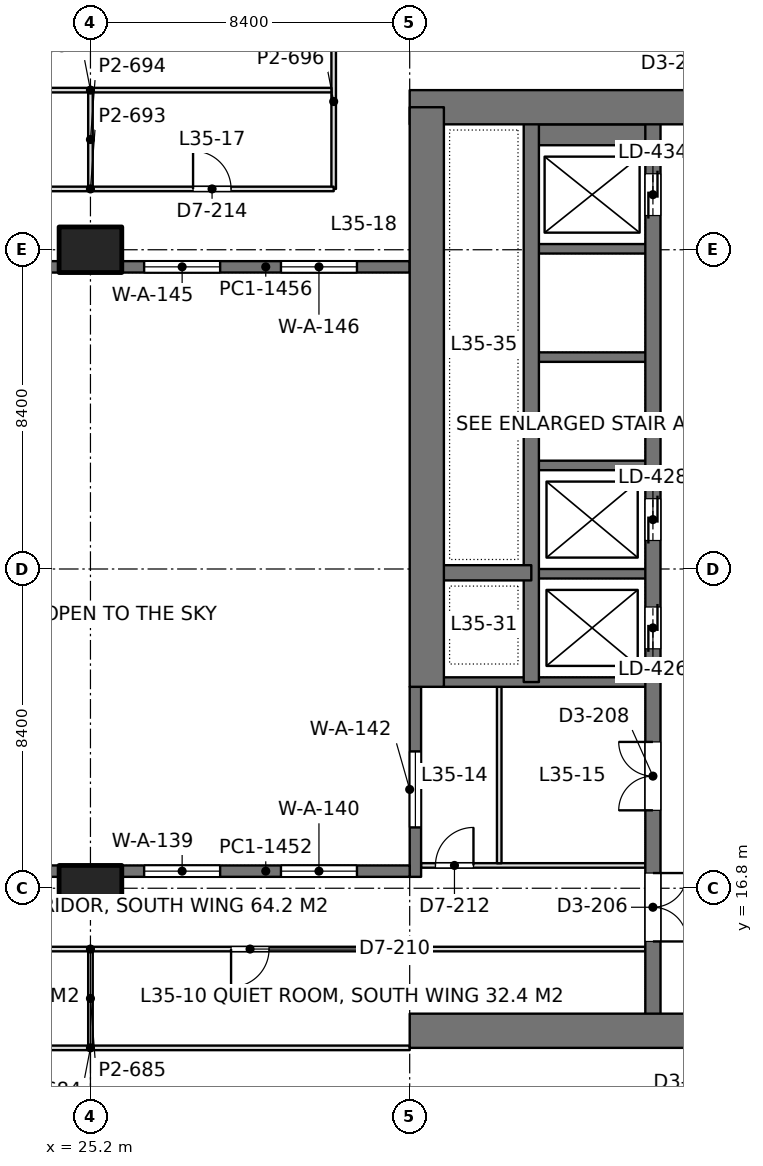
"""IFC4 building model, lengths in metres.
Left out: names, types, materials, properties, quantities, classifications, styles, units other than length and angle.
Written with IfcOpenShell. Run it as: python <this file> out.ifc"""

import sys

from ifc_helpers import new_model, si_unit, direction, frame, frame_2d, origin, origin_2d, place, context, subcontext, project, spatial, rectangle, extrude, element, fill, save


model = new_model("IFC4")
c1 = context("Model", 3, precision=1e-05, world=origin(), true_north=direction((0.0, 1.0)))
c2 = subcontext(c1, "Body", "Model", "MODEL_VIEW")
j1 = project(units=[si_unit("LENGTHUNIT", "METRE"), si_unit("PLANEANGLEUNIT", "RADIAN")], contexts=[c1])
p1 = place(None, origin())
s1 = spatial("IfcSite", under=j1, at=p1, CompositionType="ELEMENT")
p2 = place(p1, origin())
s2 = spatial("IfcBuilding", under=s1, at=p2, CompositionType="ELEMENT")
p3 = place(p2, frame((0.0, 0.0, 155.4)))
s3 = spatial("IfcBuildingStorey", under=s2, at=p3, CompositionType="ELEMENT", Elevation=155.4)
for number, where, z_axis, x_axis in (
    (1, (25.2, 16.8, 0.0), (0.0, 0.0, 1.0), (1.0, 0.0, 0.0)),
    (2, (25.2, 33.6, 0.0), (0.0, 0.0, 1.0), (1.0, 0.0, 0.0)),
):
    element("IfcColumn", number, at=place(p3, frame(where, z_axis=z_axis, x_axis=x_axis)), inside=s3, PredefinedType="COLUMN", context=c2, shape_type="SweptSolid", body=[
        extrude(rectangle(XDim=1.65, YDim=1.2, at=origin_2d()), origin(), (0.0, 0.0, 1.0), 4.2),
    ])
p4 = place(p3, frame((33.6, 13.05, 0.0), z_axis=(0.0, 0.0, 1.0), x_axis=(1.0, 0.0, 0.0)))
e3 = element("IfcWall", 3, at=p4, inside=s3, PredefinedType="SHEAR", context=c2, shape_type="SweptSolid", body=[
    extrude(rectangle(XDim=18.0, YDim=0.9, at=frame_2d((9.0, 0.0))), origin(), (0.0, 0.0, 1.0), 4.2),
])
p5 = place(p4, frame((7.25, 0.0, 0.0)))
e4 = element("IfcOpeningElement", 4, at=p5, cuts=e3, PredefinedType="OPENING", context=c2, shape_type="SweptSolid", body=[
    extrude(rectangle(XDim=1.8, YDim=2.4, at=frame_2d((0.9, 1.2))), frame((0.0, 0.46, 0.0), z_axis=(0.0, -1.0, 0.0), x_axis=(1.0, 0.0, 0.0)), (0.0, 0.0, 1.0), 0.92),
])
p6 = place(p3, frame((33.6, 37.35, 0.0), z_axis=(0.0, 0.0, 1.0), x_axis=(1.0, 0.0, 0.0)))
e5 = element("IfcWall", 5, at=p6, inside=s3, PredefinedType="SHEAR", context=c2, shape_type="SweptSolid", body=[
    extrude(rectangle(XDim=18.0, YDim=0.9, at=frame_2d((9.0, 0.0))), origin(), (0.0, 0.0, 1.0), 4.2),
])
p7 = place(p6, frame((7.25, 0.0, 0.0)))
e6 = element("IfcOpeningElement", 6, at=p7, cuts=e5, PredefinedType="OPENING", context=c2, shape_type="SweptSolid", body=[
    extrude(rectangle(XDim=1.8, YDim=2.4, at=frame_2d((0.9, 1.2))), frame((0.0, 0.46, 0.0), z_axis=(0.0, -1.0, 0.0), x_axis=(1.0, 0.0, 0.0)), (0.0, 0.0, 1.0), 0.92),
])
p8 = place(p3, frame((34.05, 22.1, 0.0), z_axis=(0.0, 0.0, 1.0), x_axis=(0.0, 1.0, 0.0)))
e7 = element("IfcWall", 7, at=p8, inside=s3, PredefinedType="SHEAR", context=c2, shape_type="SweptSolid", body=[
    extrude(rectangle(XDim=15.25, YDim=0.9, at=frame_2d((7.625, 0.0))), origin(), (0.0, 0.0, 1.0), 4.2),
])
p9 = place(p3, frame((40.0, 13.05, 0.0), z_axis=(0.0, 0.0, 1.0), x_axis=(0.0, 1.0, 0.0)))
e8 = element("IfcWall", 8, at=p9, inside=s3, PredefinedType="SHEAR", context=c2, shape_type="SweptSolid", body=[
    extrude(rectangle(XDim=24.3, YDim=0.4, at=frame_2d((12.15, 0.0))), origin(), (0.0, 0.0, 1.0), 4.2),
])
p10 = place(p9, frame((10.05, 0.0, 0.0)))
e9 = element("IfcOpeningElement", 9, at=p10, cuts=e8, PredefinedType="OPENING", context=c2, shape_type="SweptSolid", body=[
    extrude(rectangle(XDim=1.1, YDim=2.2, at=frame_2d((0.55, 1.1))), frame((0.0, 0.21, 0.0), z_axis=(0.0, -1.0, 0.0), x_axis=(1.0, 0.0, 0.0)), (0.0, 0.0, 1.0), 0.42),
])
p11 = place(p9, frame((12.9, 0.0, 0.0)))
e10 = element("IfcOpeningElement", 10, at=p11, cuts=e8, PredefinedType="OPENING", context=c2, shape_type="SweptSolid", body=[
    extrude(rectangle(XDim=1.1, YDim=2.2, at=frame_2d((0.55, 1.1))), frame((0.0, 0.21, 0.0), z_axis=(0.0, -1.0, 0.0), x_axis=(1.0, 0.0, 0.0)), (0.0, 0.0, 1.0), 0.42),
])
p12 = place(p9, frame((21.45, 0.0, 0.0)))
e11 = element("IfcOpeningElement", 11, at=p12, cuts=e8, PredefinedType="OPENING", context=c2, shape_type="SweptSolid", body=[
    extrude(rectangle(XDim=1.1, YDim=2.2, at=frame_2d((0.55, 1.1))), frame((0.0, 0.21, 0.0), z_axis=(0.0, -1.0, 0.0), x_axis=(1.0, 0.0, 0.0)), (0.0, 0.0, 1.0), 0.42),
])
p13 = place(p9, frame((2.35, 0.0, 0.0)))
e12 = element("IfcOpeningElement", 12, at=p13, cuts=e8, PredefinedType="OPENING", context=c2, shape_type="SweptSolid", body=[
    extrude(rectangle(XDim=1.8, YDim=2.4, at=frame_2d((0.9, 1.2))), frame((0.0, 0.21, 0.0), z_axis=(0.0, -1.0, 0.0), x_axis=(1.0, 0.0, 0.0)), (0.0, 0.0, 1.0), 0.42),
])
p14 = place(p9, frame((5.8, 0.0, 0.0)))
e13 = element("IfcOpeningElement", 13, at=p14, cuts=e8, PredefinedType="OPENING", context=c2, shape_type="SweptSolid", body=[
    extrude(rectangle(XDim=1.8, YDim=2.4, at=frame_2d((0.9, 1.2))), frame((0.0, 0.21, 0.0), z_axis=(0.0, -1.0, 0.0), x_axis=(1.0, 0.0, 0.0)), (0.0, 0.0, 1.0), 0.42),
])
p15 = place(p3, frame((36.8, 22.225, 0.0), z_axis=(0.0, 0.0, 1.0), x_axis=(0.0, 1.0, 0.0)))
e14 = element("IfcWall", 14, at=p15, inside=s3, PredefinedType="SHEAR", context=c2, shape_type="SweptSolid", body=[
    extrude(rectangle(XDim=15.125, YDim=0.4, at=frame_2d((7.562, 0.0))), origin(), (0.0, 0.0, 1.0), 4.2),
])
p16 = place(p3, frame((36.8, 25.1, 0.0), z_axis=(0.0, 0.0, 1.0), x_axis=(-1.0, 0.0, 0.0)))
e15 = element("IfcWall", 15, at=p16, inside=s3, PredefinedType="SHEAR", context=c2, shape_type="SweptSolid", body=[
    extrude(rectangle(XDim=2.75, YDim=0.4, at=frame_2d((1.375, 0.0))), origin(), (0.0, 0.0, 1.0), 4.2),
])
p17 = place(p3, frame((40.0, 22.225, 0.0), z_axis=(0.0, 0.0, 1.0), x_axis=(-1.0, 0.0, 0.0)))
e16 = element("IfcWall", 16, at=p17, inside=s3, PredefinedType="SHEAR", context=c2, shape_type="SweptSolid", body=[
    extrude(rectangle(XDim=5.95, YDim=0.25, at=frame_2d((2.975, 0.0))), origin(), (0.0, 0.0, 1.0), 4.2),
])
for number, where, z_axis, x_axis in (
    (17, (40.0, 25.075, 0.0), (0.0, 0.0, 1.0), (-1.0, 0.0, 0.0)),
    (18, (40.0, 27.925, 0.0), (0.0, 0.0, 1.0), (-1.0, 0.0, 0.0)),
    (19, (40.0, 30.775, 0.0), (0.0, 0.0, 1.0), (-1.0, 0.0, 0.0)),
    (20, (40.0, 33.625, 0.0), (0.0, 0.0, 1.0), (-1.0, 0.0, 0.0)),
):
    element("IfcWall", number, at=place(p3, frame(where, z_axis=z_axis, x_axis=x_axis)), inside=s3, PredefinedType="SHEAR", context=c2, shape_type="SweptSolid", body=[
        extrude(rectangle(XDim=3.2, YDim=0.25, at=frame_2d((1.6, 0.0))), origin(), (0.0, 0.0, 1.0), 4.2),
    ])
p18 = place(p3, frame((40.0, 36.625, 0.0), z_axis=(0.0, 0.0, 1.0), x_axis=(-1.0, 0.0, 0.0)))
e21 = element("IfcWall", 21, at=p18, inside=s3, PredefinedType="SHEAR", context=c2, shape_type="SweptSolid", body=[
    extrude(rectangle(XDim=3.2, YDim=0.55, at=frame_2d((1.6, 0.0))), origin(), (0.0, 0.0, 1.0), 4.2),
])
p19 = place(p3, frame((33.75, 17.1, 0.0), z_axis=(0.0, 0.0, 1.0), x_axis=(0.0, 1.0, 0.0)))
e22 = element("IfcWall", 22, at=p19, inside=s3, PredefinedType="SOLIDWALL", context=c2, shape_type="SweptSolid", body=[
    extrude(rectangle(XDim=5.0, YDim=0.3, at=frame_2d((2.5, 0.0))), origin(), (0.0, 0.0, 1.0), 4.05),
])
p20 = place(p19, frame((1.3, 0.0, 0.1)))
e23 = element("IfcOpeningElement", 23, at=p20, cuts=e22, PredefinedType="OPENING", context=c2, shape_type="SweptSolid", body=[
    extrude(rectangle(XDim=2.0, YDim=3.0, at=frame_2d((1.0, 1.5))), frame((0.0, 0.16, 0.0), z_axis=(0.0, -1.0, 0.0), x_axis=(1.0, 0.0, 0.0)), (0.0, 0.0, 1.0), 0.32),
])
p21 = place(p3, frame((16.8, 17.25, 0.0), z_axis=(0.0, 0.0, 1.0), x_axis=(1.0, 0.0, 0.0)))
e24 = element("IfcWall", 24, at=p21, inside=s3, PredefinedType="SOLIDWALL", context=c2, shape_type="SweptSolid", body=[
    extrude(rectangle(XDim=7.575, YDim=0.3, at=frame_2d((3.788, 0.0))), origin(), (0.0, 0.0, 1.0), 4.05),
])
p22 = place(p21, frame((0.988, 0.0, 0.1)))
e25 = element("IfcOpeningElement", 25, at=p22, cuts=e24, PredefinedType="OPENING", context=c2, shape_type="SweptSolid", body=[
    extrude(rectangle(XDim=2.0, YDim=3.0, at=frame_2d((1.0, 1.5))), frame((0.0, 0.16, 0.0), z_axis=(0.0, -1.0, 0.0), x_axis=(1.0, 0.0, 0.0)), (0.0, 0.0, 1.0), 0.32),
])
p23 = place(p21, frame((4.587, 0.0, 0.1)))
e26 = element("IfcOpeningElement", 26, at=p23, cuts=e24, PredefinedType="OPENING", context=c2, shape_type="SweptSolid", body=[
    extrude(rectangle(XDim=2.0, YDim=3.0, at=frame_2d((1.0, 1.5))), frame((0.0, 0.16, 0.0), z_axis=(0.0, -1.0, 0.0), x_axis=(1.0, 0.0, 0.0)), (0.0, 0.0, 1.0), 0.32),
])
p24 = place(p3, frame((26.025, 17.25, 0.0), z_axis=(0.0, 0.0, 1.0), x_axis=(1.0, 0.0, 0.0)))
e27 = element("IfcWall", 27, at=p24, inside=s3, PredefinedType="SOLIDWALL", context=c2, shape_type="SweptSolid", body=[
    extrude(rectangle(XDim=7.575, YDim=0.3, at=frame_2d((3.788, 0.0))), origin(), (0.0, 0.0, 1.0), 4.05),
])
p25 = place(p24, frame((0.587, 0.0, 0.1)))
e28 = element("IfcOpeningElement", 28, at=p25, cuts=e27, PredefinedType="OPENING", context=c2, shape_type="SweptSolid", body=[
    extrude(rectangle(XDim=2.0, YDim=3.0, at=frame_2d((1.0, 1.5))), frame((0.0, 0.16, 0.0), z_axis=(0.0, -1.0, 0.0), x_axis=(1.0, 0.0, 0.0)), (0.0, 0.0, 1.0), 0.32),
])
p26 = place(p24, frame((4.188, 0.0, 0.1)))
e29 = element("IfcOpeningElement", 29, at=p26, cuts=e27, PredefinedType="OPENING", context=c2, shape_type="SweptSolid", body=[
    extrude(rectangle(XDim=2.0, YDim=3.0, at=frame_2d((1.0, 1.5))), frame((0.0, 0.16, 0.0), z_axis=(0.0, -1.0, 0.0), x_axis=(1.0, 0.0, 0.0)), (0.0, 0.0, 1.0), 0.32),
])
p27 = place(p3, frame((16.8, 33.15, 0.0), z_axis=(0.0, 0.0, 1.0), x_axis=(1.0, 0.0, 0.0)))
e30 = element("IfcWall", 30, at=p27, inside=s3, PredefinedType="SOLIDWALL", context=c2, shape_type="SweptSolid", body=[
    extrude(rectangle(XDim=7.575, YDim=0.3, at=frame_2d((3.788, 0.0))), origin(), (0.0, 0.0, 1.0), 4.05),
])
p28 = place(p27, frame((0.988, 0.0, 0.1)))
e31 = element("IfcOpeningElement", 31, at=p28, cuts=e30, PredefinedType="OPENING", context=c2, shape_type="SweptSolid", body=[
    extrude(rectangle(XDim=2.0, YDim=3.0, at=frame_2d((1.0, 1.5))), frame((0.0, 0.16, 0.0), z_axis=(0.0, -1.0, 0.0), x_axis=(1.0, 0.0, 0.0)), (0.0, 0.0, 1.0), 0.32),
])
p29 = place(p27, frame((4.587, 0.0, 0.1)))
e32 = element("IfcOpeningElement", 32, at=p29, cuts=e30, PredefinedType="OPENING", context=c2, shape_type="SweptSolid", body=[
    extrude(rectangle(XDim=2.0, YDim=3.0, at=frame_2d((1.0, 1.5))), frame((0.0, 0.16, 0.0), z_axis=(0.0, -1.0, 0.0), x_axis=(1.0, 0.0, 0.0)), (0.0, 0.0, 1.0), 0.32),
])
p30 = place(p3, frame((26.025, 33.15, 0.0), z_axis=(0.0, 0.0, 1.0), x_axis=(1.0, 0.0, 0.0)))
e33 = element("IfcWall", 33, at=p30, inside=s3, PredefinedType="SOLIDWALL", context=c2, shape_type="SweptSolid", body=[
    extrude(rectangle(XDim=7.575, YDim=0.3, at=frame_2d((3.788, 0.0))), origin(), (0.0, 0.0, 1.0), 4.05),
])
p31 = place(p30, frame((0.587, 0.0, 0.1)))
e34 = element("IfcOpeningElement", 34, at=p31, cuts=e33, PredefinedType="OPENING", context=c2, shape_type="SweptSolid", body=[
    extrude(rectangle(XDim=2.0, YDim=3.0, at=frame_2d((1.0, 1.5))), frame((0.0, 0.16, 0.0), z_axis=(0.0, -1.0, 0.0), x_axis=(1.0, 0.0, 0.0)), (0.0, 0.0, 1.0), 0.32),
])
p32 = place(p30, frame((4.188, 0.0, 0.1)))
e35 = element("IfcOpeningElement", 35, at=p32, cuts=e33, PredefinedType="OPENING", context=c2, shape_type="SweptSolid", body=[
    extrude(rectangle(XDim=2.0, YDim=3.0, at=frame_2d((1.0, 1.5))), frame((0.0, 0.16, 0.0), z_axis=(0.0, -1.0, 0.0), x_axis=(1.0, 0.0, 0.0)), (0.0, 0.0, 1.0), 0.32),
])
p33 = place(p3, frame((33.898, 17.4, 0.0), z_axis=(0.0, 0.0, 1.0), x_axis=(1.0, 0.0, 0.0)))
e36 = element("IfcWall", 36, at=p33, inside=s3, PredefinedType="PARTITIONING", context=c2, shape_type="SweptSolid", body=[
    extrude(rectangle(XDim=5.904, YDim=0.12, at=frame_2d((2.952, 0.0))), origin(), (0.0, 0.0, 1.0), 3.55),
])
p34 = place(p33, frame((0.38, 0.0, 0.0)))
e37 = element("IfcOpeningElement", 37, at=p34, cuts=e36, PredefinedType="OPENING", context=c2, shape_type="SweptSolid", body=[
    extrude(rectangle(XDim=1.0, YDim=2.4, at=frame_2d((0.5, 1.2))), frame((0.0, 0.07, 0.0), z_axis=(0.0, -1.0, 0.0), x_axis=(1.0, 0.0, 0.0)), (0.0, 0.0, 1.0), 0.14),
])
p35 = place(p3, frame((35.956, 17.458, 0.0), z_axis=(0.0, 0.0, 1.0), x_axis=(0.0, 1.0, 0.0)))
e38 = element("IfcWall", 38, at=p35, inside=s3, PredefinedType="PARTITIONING", context=c2, shape_type="SweptSolid", body=[
    extrude(rectangle(XDim=4.644, YDim=0.12, at=frame_2d((2.322, 0.0))), origin(), (0.0, 0.0, 1.0), 3.6),
])
p36 = place(p3, frame((33.598, 15.2, 0.0), z_axis=(0.0, 0.0, 1.0), x_axis=(1.0, 0.0, 0.0)))
e39 = element("IfcWall", 39, at=p36, inside=s3, PredefinedType="PARTITIONING", context=c2, shape_type="SweptSolid", body=[
    extrude(rectangle(XDim=6.204, YDim=0.12, at=frame_2d((3.102, 0.0))), origin(), (0.0, 0.0, 1.0), 3.55),
])
p37 = place(p3, frame((25.2, 12.658, 0.0), z_axis=(0.0, 0.0, 1.0), x_axis=(0.0, 1.0, 0.0)))
e40 = element("IfcWall", 40, at=p37, inside=s3, PredefinedType="PARTITIONING", context=c2, shape_type="SweptSolid", body=[
    extrude(rectangle(XDim=2.484, YDim=0.12, at=frame_2d((1.242, 0.0))), origin(), (0.0, 0.0, 1.0), 3.55),
])
p38 = place(p3, frame((16.798, 15.2, 0.0), z_axis=(0.0, 0.0, 1.0), x_axis=(1.0, 0.0, 0.0)))
e41 = element("IfcWall", 41, at=p38, inside=s3, PredefinedType="PARTITIONING", context=c2, shape_type="SweptSolid", body=[
    extrude(rectangle(XDim=16.804, YDim=0.12, at=frame_2d((8.402, 0.0))), origin(), (0.0, 0.0, 1.0), 3.55),
])
p39 = place(p38, frame((3.702, 0.0, 0.0)))
e42 = element("IfcOpeningElement", 42, at=p39, cuts=e41, PredefinedType="OPENING", context=c2, shape_type="SweptSolid", body=[
    extrude(rectangle(XDim=1.0, YDim=2.4, at=frame_2d((0.5, 1.2))), frame((0.0, 0.07, 0.0), z_axis=(0.0, -1.0, 0.0), x_axis=(1.0, 0.0, 0.0)), (0.0, 0.0, 1.0), 0.14),
])
p40 = place(p38, frame((12.102, 0.0, 0.0)))
e43 = element("IfcOpeningElement", 43, at=p40, cuts=e41, PredefinedType="OPENING", context=c2, shape_type="SweptSolid", body=[
    extrude(rectangle(XDim=1.0, YDim=2.4, at=frame_2d((0.5, 1.2))), frame((0.0, 0.07, 0.0), z_axis=(0.0, -1.0, 0.0), x_axis=(1.0, 0.0, 0.0)), (0.0, 0.0, 1.0), 0.14),
])
p41 = place(p3, frame((16.8, 12.6, 0.0), z_axis=(0.0, 0.0, 1.0), x_axis=(1.0, 0.0, 0.0)))
e44 = element("IfcWall", 44, at=p41, inside=s3, PredefinedType="PARTITIONING", context=c2, shape_type="SweptSolid", body=[
    extrude(rectangle(XDim=16.8, YDim=0.12, at=frame_2d((8.4, 0.0))), origin(), (0.0, 0.0, 1.0), 3.55),
])
p42 = place(p3, frame((31.6, 35.2, 0.0), z_axis=(0.0, 0.0, 1.0), x_axis=(0.0, 1.0, 0.0)))
e45 = element("IfcWall", 45, at=p42, inside=s3, PredefinedType="PARTITIONING", context=c2, shape_type="SweptSolid", body=[
    extrude(rectangle(XDim=4.6, YDim=0.12, at=frame_2d((2.3, 0.0))), origin(), (0.0, 0.0, 1.0), 4.05),
])
p43 = place(p3, frame((25.2, 35.258, 0.0), z_axis=(0.0, 0.0, 1.0), x_axis=(0.0, 1.0, 0.0)))
e46 = element("IfcWall", 46, at=p43, inside=s3, PredefinedType="PARTITIONING", context=c2, shape_type="SweptSolid", body=[
    extrude(rectangle(XDim=2.484, YDim=0.12, at=frame_2d((1.242, 0.0))), origin(), (0.0, 0.0, 1.0), 3.55),
])
p44 = place(p3, frame((18.8, 35.2, 0.0), z_axis=(0.0, 0.0, 1.0), x_axis=(1.0, 0.0, 0.0)))
e47 = element("IfcWall", 47, at=p44, inside=s3, PredefinedType="PARTITIONING", context=c2, shape_type="SweptSolid", body=[
    extrude(rectangle(XDim=12.8, YDim=0.12, at=frame_2d((6.4, 0.0))), origin(), (0.0, 0.0, 1.0), 3.55),
])
p45 = place(p44, frame((2.7, 0.0, 0.0)))
e48 = element("IfcOpeningElement", 48, at=p45, cuts=e47, PredefinedType="OPENING", context=c2, shape_type="SweptSolid", body=[
    extrude(rectangle(XDim=1.0, YDim=2.4, at=frame_2d((0.5, 1.2))), frame((0.0, 0.07, 0.0), z_axis=(0.0, -1.0, 0.0), x_axis=(1.0, 0.0, 0.0)), (0.0, 0.0, 1.0), 0.14),
])
p46 = place(p44, frame((9.1, 0.0, 0.0)))
e49 = element("IfcOpeningElement", 49, at=p46, cuts=e47, PredefinedType="OPENING", context=c2, shape_type="SweptSolid", body=[
    extrude(rectangle(XDim=1.0, YDim=2.4, at=frame_2d((0.5, 1.2))), frame((0.0, 0.07, 0.0), z_axis=(0.0, -1.0, 0.0), x_axis=(1.0, 0.0, 0.0)), (0.0, 0.0, 1.0), 0.14),
])
p47 = place(p3, frame((18.858, 37.8, 0.0), z_axis=(0.0, 0.0, 1.0), x_axis=(1.0, 0.0, 0.0)))
e50 = element("IfcWall", 50, at=p47, inside=s3, PredefinedType="PARTITIONING", context=c2, shape_type="SweptSolid", body=[
    extrude(rectangle(XDim=12.684, YDim=0.12, at=frame_2d((6.342, 0.0))), origin(), (0.0, 0.0, 1.0), 3.55),
])
p48 = place(p20, origin())
e51 = element("IfcWindow", 51, at=p48, inside=s3, PartitioningType="SINGLE_PANEL", PredefinedType="WINDOW", context=c2, shape_type="SweptSolid", body=[
    extrude(rectangle(XDim=2.0, YDim=3.0, at=frame_2d((1.0, 1.5))), frame((0.0, 0.03, 0.0), z_axis=(0.0, -1.0, 0.0), x_axis=(1.0, 0.0, 0.0)), (0.0, 0.0, 1.0), 0.06),
])
fill(e23, e51)
p49 = place(p25, origin())
e52 = element("IfcWindow", 52, at=p49, inside=s3, PartitioningType="SINGLE_PANEL", PredefinedType="WINDOW", context=c2, shape_type="SweptSolid", body=[
    extrude(rectangle(XDim=2.0, YDim=3.0, at=frame_2d((1.0, 1.5))), frame((0.0, 0.03, 0.0), z_axis=(0.0, -1.0, 0.0), x_axis=(1.0, 0.0, 0.0)), (0.0, 0.0, 1.0), 0.06),
])
fill(e28, e52)
p50 = place(p26, origin())
e53 = element("IfcWindow", 53, at=p50, inside=s3, PartitioningType="SINGLE_PANEL", PredefinedType="WINDOW", context=c2, shape_type="SweptSolid", body=[
    extrude(rectangle(XDim=2.0, YDim=3.0, at=frame_2d((1.0, 1.5))), frame((0.0, 0.03, 0.0), z_axis=(0.0, -1.0, 0.0), x_axis=(1.0, 0.0, 0.0)), (0.0, 0.0, 1.0), 0.06),
])
fill(e29, e53)
p51 = place(p31, origin())
e54 = element("IfcWindow", 54, at=p51, inside=s3, PartitioningType="SINGLE_PANEL", PredefinedType="WINDOW", context=c2, shape_type="SweptSolid", body=[
    extrude(rectangle(XDim=2.0, YDim=3.0, at=frame_2d((1.0, 1.5))), frame((0.0, 0.03, 0.0), z_axis=(0.0, -1.0, 0.0), x_axis=(1.0, 0.0, 0.0)), (0.0, 0.0, 1.0), 0.06),
])
fill(e34, e54)
p52 = place(p32, origin())
e55 = element("IfcWindow", 55, at=p52, inside=s3, PartitioningType="SINGLE_PANEL", PredefinedType="WINDOW", context=c2, shape_type="SweptSolid", body=[
    extrude(rectangle(XDim=2.0, YDim=3.0, at=frame_2d((1.0, 1.5))), frame((0.0, 0.03, 0.0), z_axis=(0.0, -1.0, 0.0), x_axis=(1.0, 0.0, 0.0)), (0.0, 0.0, 1.0), 0.06),
])
fill(e35, e55)
p53 = place(p10, origin())
e56 = element("IfcDoor", 56, at=p53, inside=s3, OperationType="DOUBLE_DOOR_SLIDING", PredefinedType="DOOR", context=c2, shape_type="SweptSolid", body=[
    extrude(rectangle(XDim=1.1, YDim=2.2, at=frame_2d((0.55, 1.1))), frame((0.0, 0.025, 0.0), z_axis=(0.0, -1.0, 0.0), x_axis=(1.0, 0.0, 0.0)), (0.0, 0.0, 1.0), 0.05),
])
fill(e9, e56)
p54 = place(p11, origin())
e57 = element("IfcDoor", 57, at=p54, inside=s3, OperationType="DOUBLE_DOOR_SLIDING", PredefinedType="DOOR", context=c2, shape_type="SweptSolid", body=[
    extrude(rectangle(XDim=1.1, YDim=2.2, at=frame_2d((0.55, 1.1))), frame((0.0, 0.025, 0.0), z_axis=(0.0, -1.0, 0.0), x_axis=(1.0, 0.0, 0.0)), (0.0, 0.0, 1.0), 0.05),
])
fill(e10, e57)
p55 = place(p12, origin())
e58 = element("IfcDoor", 58, at=p55, inside=s3, OperationType="DOUBLE_DOOR_SLIDING", PredefinedType="DOOR", context=c2, shape_type="SweptSolid", body=[
    extrude(rectangle(XDim=1.1, YDim=2.2, at=frame_2d((0.55, 1.1))), frame((0.0, 0.025, 0.0), z_axis=(0.0, -1.0, 0.0), x_axis=(1.0, 0.0, 0.0)), (0.0, 0.0, 1.0), 0.05),
])
fill(e11, e58)
p56 = place(p13, frame((1.8, 0.0, 0.0), z_axis=(0.0, 0.0, 1.0), x_axis=(-1.0, 0.0, 0.0)))
e59 = element("IfcDoor", 59, at=p56, inside=s3, OperationType="DOUBLE_DOOR_SINGLE_SWING", PredefinedType="DOOR", context=c2, shape_type="SweptSolid", body=[
    extrude(rectangle(XDim=1.8, YDim=2.4, at=frame_2d((0.9, 1.2))), frame((0.0, 0.025, 0.0), z_axis=(0.0, -1.0, 0.0), x_axis=(1.0, 0.0, 0.0)), (0.0, 0.0, 1.0), 0.05),
])
fill(e12, e59)
p57 = place(p14, origin())
e60 = element("IfcDoor", 60, at=p57, inside=s3, OperationType="DOUBLE_DOOR_SINGLE_SWING", PredefinedType="DOOR", context=c2, shape_type="SweptSolid", body=[
    extrude(rectangle(XDim=1.8, YDim=2.4, at=frame_2d((0.9, 1.2))), frame((0.0, 0.025, 0.0), z_axis=(0.0, -1.0, 0.0), x_axis=(1.0, 0.0, 0.0)), (0.0, 0.0, 1.0), 0.05),
])
fill(e13, e60)
p58 = place(p34, origin())
e61 = element("IfcDoor", 61, at=p58, inside=s3, OperationType="SINGLE_SWING_RIGHT", PredefinedType="DOOR", context=c2, shape_type="SweptSolid", body=[
    extrude(rectangle(XDim=1.0, YDim=2.4, at=frame_2d((0.5, 1.2))), frame((0.0, 0.025, 0.0), z_axis=(0.0, -1.0, 0.0), x_axis=(1.0, 0.0, 0.0)), (0.0, 0.0, 1.0), 0.05),
])
fill(e37, e61)
p59 = place(p40, frame((1.0, 0.0, 0.0), z_axis=(0.0, 0.0, 1.0), x_axis=(-1.0, 0.0, 0.0)))
e62 = element("IfcDoor", 62, at=p59, inside=s3, OperationType="SINGLE_SWING_RIGHT", PredefinedType="DOOR", context=c2, shape_type="SweptSolid", body=[
    extrude(rectangle(XDim=1.0, YDim=2.4, at=frame_2d((0.5, 1.2))), frame((0.0, 0.025, 0.0), z_axis=(0.0, -1.0, 0.0), x_axis=(1.0, 0.0, 0.0)), (0.0, 0.0, 1.0), 0.05),
])
fill(e43, e62)
p60 = place(p46, origin())
e63 = element("IfcDoor", 63, at=p60, inside=s3, OperationType="SINGLE_SWING_LEFT", PredefinedType="DOOR", context=c2, shape_type="SweptSolid", body=[
    extrude(rectangle(XDim=1.0, YDim=2.4, at=frame_2d((0.5, 1.2))), frame((0.0, 0.025, 0.0), z_axis=(0.0, -1.0, 0.0), x_axis=(1.0, 0.0, 0.0)), (0.0, 0.0, 1.0), 0.05),
])
fill(e49, e63)
save(model, sys.argv[1])
